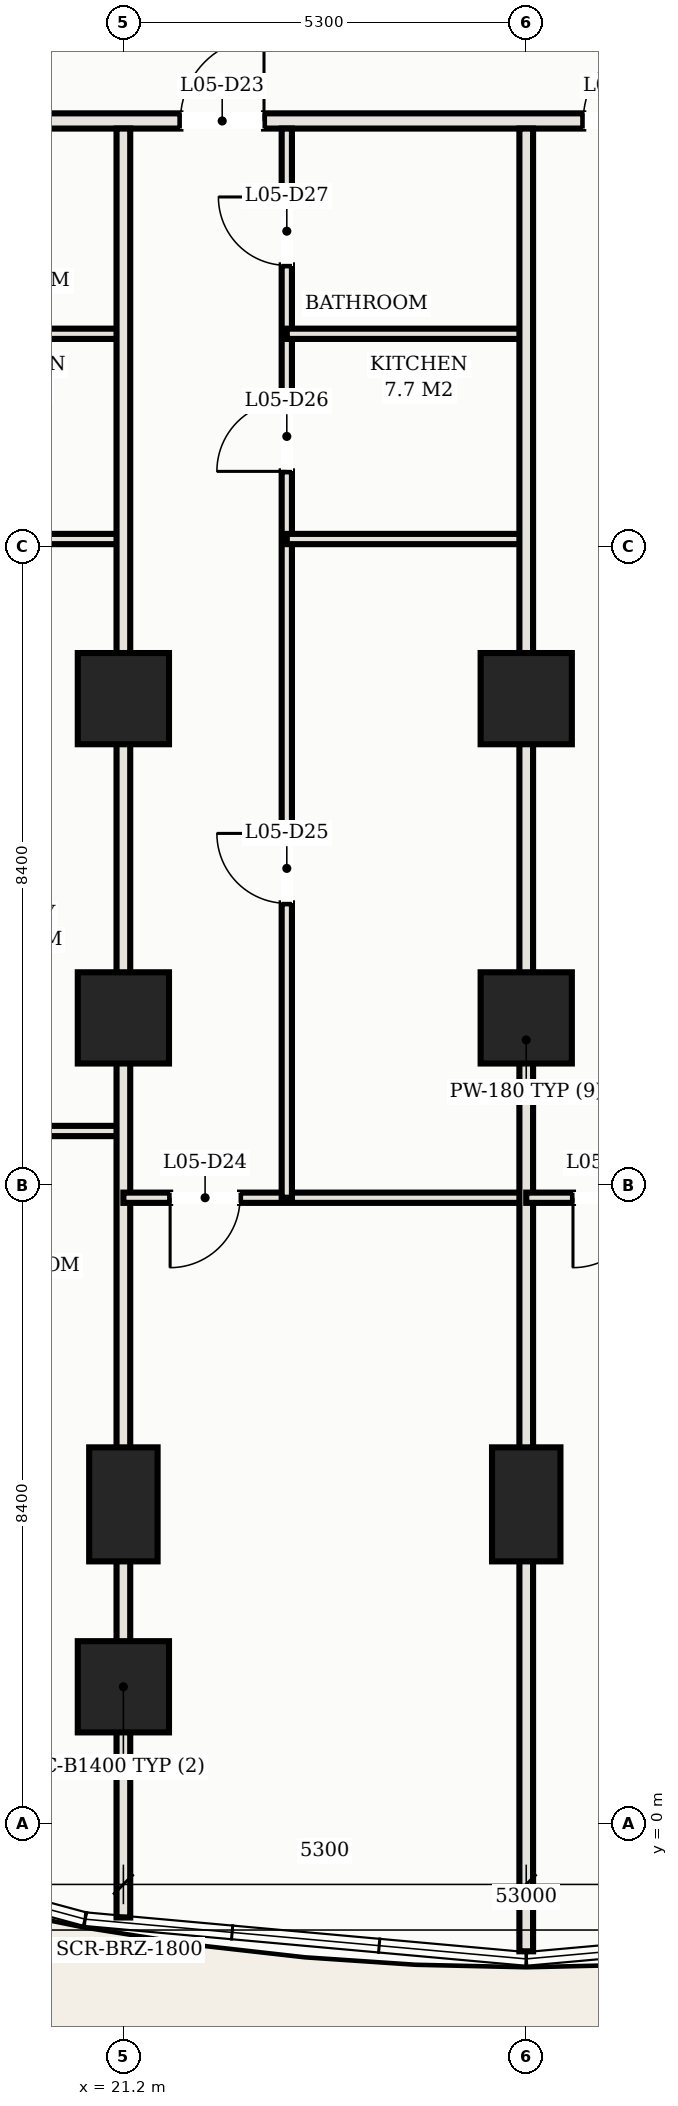
"""IFC4 building model, lengths in metres.
Left out: names, types, materials, properties, quantities, classifications, styles, units other than length and angle.
Written with IfcOpenShell. Run it as: python <this file> out.ifc"""

import sys

from ifc_helpers import new_model, si_unit, direction, frame, frame_2d, origin, origin_2d, place, context, subcontext, project, spatial, rectangle, hollow_rectangle, extrude, element, fill, save


model = new_model("IFC4")
c1 = context("Model", 3, precision=1e-05, world=origin(), true_north=direction((0.0, 1.0)))
c2 = subcontext(c1, "Body", "Model", "MODEL_VIEW")
j1 = project(units=[si_unit("LENGTHUNIT", "METRE"), si_unit("PLANEANGLEUNIT", "RADIAN")], contexts=[c1])
p1 = place(None, origin())
s1 = spatial("IfcSite", under=j1, at=p1, CompositionType="ELEMENT")
p2 = place(p1, origin())
s2 = spatial("IfcBuilding", under=s1, at=p2, CompositionType="ELEMENT")
p3 = place(p2, frame((0.0, 0.0, 24.2)))
s3 = spatial("IfcBuildingStorey", under=s2, at=p3, CompositionType="ELEMENT", Elevation=24.2)
for number, where, z_axis, x_axis in (
    (1, (21.2, 14.8, 0.0), (0.0, 0.0, 1.0), (1.0, 0.0, 0.0)),
    (2, (21.2, 10.6, 0.0), (0.0, 0.0, 1.0), (1.0, 0.0, 0.0)),
    (3, (26.5, 14.8, 0.0), (0.0, 0.0, 1.0), (1.0, 0.0, 0.0)),
    (4, (26.5, 10.6, 0.0), (0.0, 0.0, 1.0), (1.0, 0.0, 0.0)),
    (5, (21.2, 1.8, 0.0), (0.0, 0.0, 1.0), (1.0, 0.0, 0.0)),
):
    element("IfcColumn", number, at=place(p3, frame(where, z_axis=z_axis, x_axis=x_axis)), inside=s3, PredefinedType="COLUMN", context=c2, shape_type="SweptSolid", body=[
        extrude(hollow_rectangle(XDim=1.2, YDim=1.2, WallThickness=0.04, at=origin_2d()), origin(), (0.0, 0.0, 1.0), 3.3),
    ])
for number, where, z_axis, x_axis in (
    (6, (21.2, 4.2, 0.0), (0.0, 0.0, 1.0), (1.0, 0.0, 0.0)),
    (7, (26.5, 4.2, 0.0), (0.0, 0.0, 1.0), (1.0, 0.0, 0.0)),
):
    element("IfcColumn", number, at=place(p3, frame(where, z_axis=z_axis, x_axis=x_axis)), inside=s3, PredefinedType="COLUMN", context=c2, shape_type="SweptSolid", body=[
        extrude(hollow_rectangle(XDim=0.9, YDim=1.5, WallThickness=0.036, at=origin_2d()), origin(), (0.0, 0.0, 1.0), 3.3),
    ])
p4 = place(p3, frame((0.12, 22.4, 0.0), z_axis=(0.0, 0.0, 1.0), x_axis=(1.0, 0.0, 0.0)))
e8 = element("IfcWall", 8, at=p4, inside=s3, PredefinedType="PARTITIONING", context=c2, shape_type="SweptSolid", body=[
    extrude(rectangle(XDim=52.76, YDim=0.2, at=frame_2d((26.38, 0.0))), origin(), (0.0, 0.0, 1.0), 2.57),
])
p5 = place(p4, frame((11.23, 0.0, 0.0)))
e9 = element("IfcOpeningElement", 9, at=p5, cuts=e8, PredefinedType="OPENING", context=c2, shape_type="SweptSolid", body=[
    extrude(rectangle(XDim=1.1, YDim=2.25, at=frame_2d((0.55, 1.125))), frame((0.0, 0.11, 0.0), z_axis=(0.0, -1.0, 0.0), x_axis=(1.0, 0.0, 0.0)), (0.0, 0.0, 1.0), 0.22),
])
p6 = place(p4, frame((16.53, 0.0, 0.0)))
e10 = element("IfcOpeningElement", 10, at=p6, cuts=e8, PredefinedType="OPENING", context=c2, shape_type="SweptSolid", body=[
    extrude(rectangle(XDim=1.1, YDim=2.25, at=frame_2d((0.55, 1.125))), frame((0.0, 0.11, 0.0), z_axis=(0.0, -1.0, 0.0), x_axis=(1.0, 0.0, 0.0)), (0.0, 0.0, 1.0), 0.22),
])
p7 = place(p4, frame((21.83, 0.0, 0.0)))
e11 = element("IfcOpeningElement", 11, at=p7, cuts=e8, PredefinedType="OPENING", context=c2, shape_type="SweptSolid", body=[
    extrude(rectangle(XDim=1.1, YDim=2.25, at=frame_2d((0.55, 1.125))), frame((0.0, 0.11, 0.0), z_axis=(0.0, -1.0, 0.0), x_axis=(1.0, 0.0, 0.0)), (0.0, 0.0, 1.0), 0.22),
])
p8 = place(p4, frame((27.13, 0.0, 0.0)))
e12 = element("IfcOpeningElement", 12, at=p8, cuts=e8, PredefinedType="OPENING", context=c2, shape_type="SweptSolid", body=[
    extrude(rectangle(XDim=1.1, YDim=2.25, at=frame_2d((0.55, 1.125))), frame((0.0, 0.11, 0.0), z_axis=(0.0, -1.0, 0.0), x_axis=(1.0, 0.0, 0.0)), (0.0, 0.0, 1.0), 0.22),
])
p9 = place(p4, frame((32.43, 0.0, 0.0)))
e13 = element("IfcOpeningElement", 13, at=p9, cuts=e8, PredefinedType="OPENING", context=c2, shape_type="SweptSolid", body=[
    extrude(rectangle(XDim=1.1, YDim=2.25, at=frame_2d((0.55, 1.125))), frame((0.0, 0.11, 0.0), z_axis=(0.0, -1.0, 0.0), x_axis=(1.0, 0.0, 0.0)), (0.0, 0.0, 1.0), 0.22),
])
p10 = place(p4, frame((37.73, 0.0, 0.0)))
e14 = element("IfcOpeningElement", 14, at=p10, cuts=e8, PredefinedType="OPENING", context=c2, shape_type="SweptSolid", body=[
    extrude(rectangle(XDim=1.1, YDim=2.25, at=frame_2d((0.55, 1.125))), frame((0.0, 0.11, 0.0), z_axis=(0.0, -1.0, 0.0), x_axis=(1.0, 0.0, 0.0)), (0.0, 0.0, 1.0), 0.22),
])
p11 = place(p4, frame((4.735, 0.0, 0.0)))
e15 = element("IfcOpeningElement", 15, at=p11, cuts=e8, PredefinedType="OPENING", context=c2, shape_type="SweptSolid", body=[
    extrude(rectangle(XDim=0.92, YDim=2.15, at=frame_2d((0.46, 1.075))), frame((0.0, 0.11, 0.0), z_axis=(0.0, -1.0, 0.0), x_axis=(1.0, 0.0, 0.0)), (0.0, 0.0, 1.0), 0.22),
])
p12 = place(p4, frame((47.105, 0.0, 0.0)))
e16 = element("IfcOpeningElement", 16, at=p12, cuts=e8, PredefinedType="OPENING", context=c2, shape_type="SweptSolid", body=[
    extrude(rectangle(XDim=0.92, YDim=2.15, at=frame_2d((0.46, 1.075))), frame((0.0, 0.11, 0.0), z_axis=(0.0, -1.0, 0.0), x_axis=(1.0, 0.0, 0.0)), (0.0, 0.0, 1.0), 0.22),
])
p13 = place(p3, frame((15.9, 9.112, 0.0), z_axis=(0.0, 0.0, 1.0), x_axis=(1.0, 0.0, 0.0)))
e17 = element("IfcWall", 17, at=p13, inside=s3, PredefinedType="PARTITIONING", context=c2, shape_type="SweptSolid", body=[
    extrude(rectangle(XDim=5.3, YDim=0.135, at=frame_2d((2.65, 0.0))), origin(), (0.0, 0.0, 1.0), 2.57),
])
p14 = place(p13, frame((0.815, 0.0, 0.0)))
e18 = element("IfcOpeningElement", 18, at=p14, cuts=e17, PredefinedType="OPENING", context=c2, shape_type="SweptSolid", body=[
    extrude(rectangle(XDim=0.92, YDim=2.15, at=frame_2d((0.46, 1.075))), frame((0.0, 0.078, 0.0), z_axis=(0.0, -1.0, 0.0), x_axis=(1.0, 0.0, 0.0)), (0.0, 0.0, 1.0), 0.155),
])
for number, where, z_axis, x_axis in (
    (19, (18.05, 16.9, 0.0), (0.0, 0.0, 1.0), (1.0, 0.0, 0.0)),
    (20, (18.05, 19.6, 0.0), (0.0, 0.0, 1.0), (1.0, 0.0, 0.0)),
):
    element("IfcWall", number, at=place(p3, frame(where, z_axis=z_axis, x_axis=x_axis)), inside=s3, PredefinedType="PARTITIONING", context=c2, shape_type="SweptSolid", body=[
        extrude(rectangle(XDim=3.15, YDim=0.135, at=frame_2d((1.575, 0.0))), origin(), (0.0, 0.0, 1.0), 2.57),
    ])
p15 = place(p3, frame((21.2, -1.235, 0.0), z_axis=(0.0, 0.0, 1.0), x_axis=(0.0, 1.0, 0.0)))
e21 = element("IfcWall", 21, at=p15, inside=s3, PredefinedType="PARTITIONING", context=c2, shape_type="SweptSolid", body=[
    extrude(rectangle(XDim=23.535, YDim=0.18, at=frame_2d((11.768, 0.0))), origin(), (0.0, 0.0, 1.0), 2.275),
])
p16 = place(p3, frame((21.2, 8.234, 0.0), z_axis=(0.0, 0.0, 1.0), x_axis=(1.0, 0.0, 0.0)))
e22 = element("IfcWall", 22, at=p16, inside=s3, PredefinedType="PARTITIONING", context=c2, shape_type="SweptSolid", body=[
    extrude(rectangle(XDim=5.3, YDim=0.135, at=frame_2d((2.65, 0.0))), origin(), (0.0, 0.0, 1.0), 2.57),
])
p17 = place(p16, frame((0.615, 0.0, 0.0)))
e23 = element("IfcOpeningElement", 23, at=p17, cuts=e22, PredefinedType="OPENING", context=c2, shape_type="SweptSolid", body=[
    extrude(rectangle(XDim=0.92, YDim=2.15, at=frame_2d((0.46, 1.075))), frame((0.0, 0.078, 0.0), z_axis=(0.0, -1.0, 0.0), x_axis=(1.0, 0.0, 0.0)), (0.0, 0.0, 1.0), 0.155),
])
p18 = place(p3, frame((23.35, 8.234, 0.0), z_axis=(0.0, 0.0, 1.0), x_axis=(0.0, 1.0, 0.0)))
e24 = element("IfcWall", 24, at=p18, inside=s3, PredefinedType="PARTITIONING", context=c2, shape_type="SweptSolid", body=[
    extrude(rectangle(XDim=14.066, YDim=0.135, at=frame_2d((7.033, 0.0))), origin(), (0.0, 0.0, 1.0), 2.57),
])
p19 = place(p18, frame((3.873, 0.0, 0.0)))
e25 = element("IfcOpeningElement", 25, at=p19, cuts=e24, PredefinedType="OPENING", context=c2, shape_type="SweptSolid", body=[
    extrude(rectangle(XDim=0.92, YDim=2.15, at=frame_2d((0.46, 1.075))), frame((0.0, 0.078, 0.0), z_axis=(0.0, -1.0, 0.0), x_axis=(1.0, 0.0, 0.0)), (0.0, 0.0, 1.0), 0.155),
])
p20 = place(p18, frame((9.556, 0.0, 0.0)))
e26 = element("IfcOpeningElement", 26, at=p20, cuts=e24, PredefinedType="OPENING", context=c2, shape_type="SweptSolid", body=[
    extrude(rectangle(XDim=0.92, YDim=2.15, at=frame_2d((0.46, 1.075))), frame((0.0, 0.078, 0.0), z_axis=(0.0, -1.0, 0.0), x_axis=(1.0, 0.0, 0.0)), (0.0, 0.0, 1.0), 0.155),
])
p21 = place(p18, frame((12.266, 0.0, 0.0)))
e27 = element("IfcOpeningElement", 27, at=p21, cuts=e24, PredefinedType="OPENING", context=c2, shape_type="SweptSolid", body=[
    extrude(rectangle(XDim=0.9, YDim=2.15, at=frame_2d((0.45, 1.075))), frame((0.0, 0.078, 0.0), z_axis=(0.0, -1.0, 0.0), x_axis=(1.0, 0.0, 0.0)), (0.0, 0.0, 1.0), 0.155),
])
for number, where, z_axis, x_axis in (
    (28, (23.35, 16.9, 0.0), (0.0, 0.0, 1.0), (1.0, 0.0, 0.0)),
    (29, (23.35, 19.6, 0.0), (0.0, 0.0, 1.0), (1.0, 0.0, 0.0)),
):
    element("IfcWall", number, at=place(p3, frame(where, z_axis=z_axis, x_axis=x_axis)), inside=s3, PredefinedType="PARTITIONING", context=c2, shape_type="SweptSolid", body=[
        extrude(rectangle(XDim=3.15, YDim=0.135, at=frame_2d((1.575, 0.0))), origin(), (0.0, 0.0, 1.0), 2.57),
    ])
p22 = place(p3, frame((26.5, -1.68, 0.0), z_axis=(0.0, 0.0, 1.0), x_axis=(0.0, 1.0, 0.0)))
e30 = element("IfcWall", 30, at=p22, inside=s3, PredefinedType="PARTITIONING", context=c2, shape_type="SweptSolid", body=[
    extrude(rectangle(XDim=23.98, YDim=0.18, at=frame_2d((11.99, 0.0))), origin(), (0.0, 0.0, 1.0), 2.275),
])
p23 = place(p3, frame((26.5, 8.234, 0.0), z_axis=(0.0, 0.0, 1.0), x_axis=(1.0, 0.0, 0.0)))
e31 = element("IfcWall", 31, at=p23, inside=s3, PredefinedType="PARTITIONING", context=c2, shape_type="SweptSolid", body=[
    extrude(rectangle(XDim=5.3, YDim=0.135, at=frame_2d((2.65, 0.0))), origin(), (0.0, 0.0, 1.0), 2.57),
])
p24 = place(p23, frame((0.615, 0.0, 0.0)))
e32 = element("IfcOpeningElement", 32, at=p24, cuts=e31, PredefinedType="OPENING", context=c2, shape_type="SweptSolid", body=[
    extrude(rectangle(XDim=0.92, YDim=2.15, at=frame_2d((0.46, 1.075))), frame((0.0, 0.078, 0.0), z_axis=(0.0, -1.0, 0.0), x_axis=(1.0, 0.0, 0.0)), (0.0, 0.0, 1.0), 0.155),
])
p25 = place(p7, origin())
e33 = element("IfcDoor", 33, at=p25, inside=s3, OperationType="SINGLE_SWING_RIGHT", PredefinedType="DOOR", context=c2, shape_type="SweptSolid", body=[
    extrude(rectangle(XDim=1.1, YDim=2.25, at=frame_2d((0.55, 1.125))), frame((0.0, 0.025, 0.0), z_axis=(0.0, -1.0, 0.0), x_axis=(1.0, 0.0, 0.0)), (0.0, 0.0, 1.0), 0.05),
])
fill(e11, e33)
p26 = place(p17, frame((0.92, 0.0, 0.0), z_axis=(0.0, 0.0, 1.0), x_axis=(-1.0, 0.0, 0.0)))
e34 = element("IfcDoor", 34, at=p26, inside=s3, OperationType="SINGLE_SWING_RIGHT", PredefinedType="DOOR", context=c2, shape_type="SweptSolid", body=[
    extrude(rectangle(XDim=0.92, YDim=2.15, at=frame_2d((0.46, 1.075))), frame((0.0, 0.025, 0.0), z_axis=(0.0, -1.0, 0.0), x_axis=(1.0, 0.0, 0.0)), (0.0, 0.0, 1.0), 0.05),
])
fill(e23, e34)
p27 = place(p19, origin())
e35 = element("IfcDoor", 35, at=p27, inside=s3, OperationType="SINGLE_SWING_RIGHT", PredefinedType="DOOR", context=c2, shape_type="SweptSolid", body=[
    extrude(rectangle(XDim=0.92, YDim=2.15, at=frame_2d((0.46, 1.075))), frame((0.0, 0.025, 0.0), z_axis=(0.0, -1.0, 0.0), x_axis=(1.0, 0.0, 0.0)), (0.0, 0.0, 1.0), 0.05),
])
fill(e25, e35)
p28 = place(p20, origin())
e36 = element("IfcDoor", 36, at=p28, inside=s3, OperationType="SINGLE_SWING_LEFT", PredefinedType="DOOR", context=c2, shape_type="SweptSolid", body=[
    extrude(rectangle(XDim=0.92, YDim=2.15, at=frame_2d((0.46, 1.075))), frame((0.0, 0.025, 0.0), z_axis=(0.0, -1.0, 0.0), x_axis=(1.0, 0.0, 0.0)), (0.0, 0.0, 1.0), 0.05),
])
fill(e26, e36)
p29 = place(p21, origin())
e37 = element("IfcDoor", 37, at=p29, inside=s3, OperationType="SINGLE_SWING_RIGHT", PredefinedType="DOOR", context=c2, shape_type="SweptSolid", body=[
    extrude(rectangle(XDim=0.9, YDim=2.15, at=frame_2d((0.45, 1.075))), frame((0.0, 0.025, 0.0), z_axis=(0.0, -1.0, 0.0), x_axis=(1.0, 0.0, 0.0)), (0.0, 0.0, 1.0), 0.05),
])
fill(e27, e37)
p30 = place(p8, origin())
e38 = element("IfcDoor", 38, at=p30, inside=s3, OperationType="SINGLE_SWING_RIGHT", PredefinedType="DOOR", context=c2, shape_type="SweptSolid", body=[
    extrude(rectangle(XDim=1.1, YDim=2.25, at=frame_2d((0.55, 1.125))), frame((0.0, 0.025, 0.0), z_axis=(0.0, -1.0, 0.0), x_axis=(1.0, 0.0, 0.0)), (0.0, 0.0, 1.0), 0.05),
])
fill(e12, e38)
p31 = place(p24, frame((0.92, 0.0, 0.0), z_axis=(0.0, 0.0, 1.0), x_axis=(-1.0, 0.0, 0.0)))
e39 = element("IfcDoor", 39, at=p31, inside=s3, OperationType="SINGLE_SWING_RIGHT", PredefinedType="DOOR", context=c2, shape_type="SweptSolid", body=[
    extrude(rectangle(XDim=0.92, YDim=2.15, at=frame_2d((0.46, 1.075))), frame((0.0, 0.025, 0.0), z_axis=(0.0, -1.0, 0.0), x_axis=(1.0, 0.0, 0.0)), (0.0, 0.0, 1.0), 0.05),
])
fill(e32, e39)
save(model, sys.argv[1])
